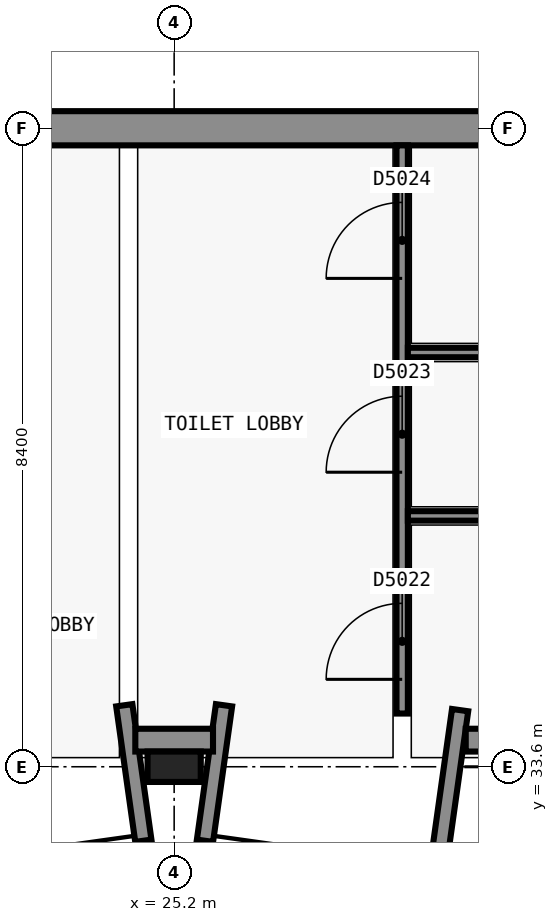
"""IFC4 building model, lengths in metres.
Left out: names, types, materials, properties, quantities, classifications, styles, units other than length and angle.
Written with IfcOpenShell. Run it as: python <this file> out.ifc"""

import sys

from ifc_helpers import new_model, si_unit, direction, frame, frame_2d, origin, origin_2d, place, context, subcontext, project, spatial, rectangle, extrude, element, fill, save


model = new_model("IFC4")
c1 = context("Model", 3, precision=1e-05, world=origin(), true_north=direction((0.0, 1.0)))
c2 = subcontext(c1, "Body", "Model", "MODEL_VIEW")
j1 = project(units=[si_unit("LENGTHUNIT", "METRE"), si_unit("PLANEANGLEUNIT", "RADIAN")], contexts=[c1])
p1 = place(None, origin())
s1 = spatial("IfcSite", under=j1, at=p1, CompositionType="ELEMENT")
p2 = place(p1, origin())
s2 = spatial("IfcBuilding", under=s1, at=p2, CompositionType="ELEMENT")
p3 = place(p2, frame((0.0, 0.0, 24.6)))
s3 = spatial("IfcBuildingStorey", under=s2, at=p3, CompositionType="ELEMENT", Elevation=24.6)
p4 = place(p3, frame((33.6, 42.0, 0.0), z_axis=(0.0, 0.0, 1.0), x_axis=(-1.0, 0.0, 0.0)))
e1 = element("IfcWall", 1, at=p4, inside=s3, PredefinedType="SHEAR", context=c2, shape_type="SweptSolid", body=[
    extrude(rectangle(XDim=16.575, YDim=0.45, at=frame_2d((8.288, 0.0))), origin(), (0.0, 0.0, 1.0), 4.5),
])
p5 = place(p3, frame((25.2, 33.6, 0.0), z_axis=(0.0, 0.0, 1.0), x_axis=(1.0, 0.0, 0.0)))
e2 = element("IfcColumn", 2, at=p5, inside=s3, PredefinedType="COLUMN", context=c2, shape_type="SweptSolid", body=[
    extrude(rectangle(XDim=0.7, YDim=0.4, at=origin_2d()), origin(), (0.0, 0.0, 1.0), 4.5),
])
for number, where, z_axis, x_axis in (
    (3, (24.544, 34.409, 0.0), (0.0, 0.0, 1.0), (0.139, -0.99, 0.0)),
    (4, (25.856, 34.409, 0.0), (0.0, 0.0, 1.0), (-0.139, -0.99, 0.0)),
):
    element("IfcWall", number, at=place(p3, frame(where, z_axis=z_axis, x_axis=x_axis)), inside=s3, PredefinedType="SOLIDWALL", context=c2, shape_type="SweptSolid", body=[
        extrude(rectangle(XDim=1.8, YDim=0.215, at=frame_2d((0.9, 0.0))), origin(), (0.0, 0.0, 1.0), 4.2),
    ])
p6 = place(p3, frame((28.962, 34.345, 0.0), z_axis=(0.0, 0.0, 1.0), x_axis=(-0.139230687381, -0.99025997379, 0.0)))
e5 = element("IfcWall", 5, at=p6, inside=s3, PredefinedType="SOLIDWALL", context=c2, shape_type="SweptSolid", body=[
    extrude(rectangle(XDim=2.169, YDim=0.215, at=frame_2d((1.084, 0.0))), origin(), (0.0, 0.0, 1.0), 4.2),
])
p7 = place(p3, frame((25.711, 33.95, 0.0), z_axis=(0.0, 0.0, 1.0), x_axis=(-1.0, 0.0, 0.0)))
e6 = element("IfcWall", 6, at=p7, inside=s3, PredefinedType="SOLIDWALL", context=c2, shape_type="SweptSolid", body=[
    extrude(rectangle(XDim=1.022, YDim=0.3, at=frame_2d((0.511, 0.0))), origin(), (0.0, 0.0, 1.0), 3.962),
])
p8 = place(p3, frame((29.764, 33.95, 0.0), z_axis=(0.0, 0.0, 1.0), x_axis=(-1.0, 0.0, 0.0)))
e7 = element("IfcWall", 7, at=p8, inside=s3, PredefinedType="SOLIDWALL", context=c2, shape_type="SweptSolid", body=[
    extrude(rectangle(XDim=0.728, YDim=0.3, at=frame_2d((0.364, 0.0))), origin(), (0.0, 0.0, 1.0), 3.962),
])
p9 = place(p3, frame((28.2, 34.3, 0.0), z_axis=(0.0, 0.0, 1.0), x_axis=(0.0, 1.0, 0.0)))
e8 = element("IfcWall", 8, at=p9, inside=s3, PredefinedType="PARTITIONING", context=c2, shape_type="SweptSolid", body=[
    extrude(rectangle(XDim=7.475, YDim=0.15, at=frame_2d((3.737, 0.0))), origin(), (0.0, 0.0, 1.0), 4.1),
])
p10 = place(p9, frame((0.45, 0.0, 0.0)))
e9 = element("IfcOpeningElement", 9, at=p10, cuts=e8, PredefinedType="OPENING", context=c2, shape_type="SweptSolid", body=[
    extrude(rectangle(XDim=1.0, YDim=2.1, at=frame_2d((0.5, 1.05))), frame((0.0, 0.085, 0.0), z_axis=(0.0, -1.0, 0.0), x_axis=(1.0, 0.0, 0.0)), (0.0, 0.0, 1.0), 0.17),
])
p11 = place(p9, frame((3.175, 0.0, 0.0)))
e10 = element("IfcOpeningElement", 10, at=p11, cuts=e8, PredefinedType="OPENING", context=c2, shape_type="SweptSolid", body=[
    extrude(rectangle(XDim=1.0, YDim=2.1, at=frame_2d((0.5, 1.05))), frame((0.0, 0.085, 0.0), z_axis=(0.0, -1.0, 0.0), x_axis=(1.0, 0.0, 0.0)), (0.0, 0.0, 1.0), 0.17),
])
p12 = place(p9, frame((5.725, 0.0, 0.0)))
e11 = element("IfcOpeningElement", 11, at=p12, cuts=e8, PredefinedType="OPENING", context=c2, shape_type="SweptSolid", body=[
    extrude(rectangle(XDim=1.0, YDim=2.1, at=frame_2d((0.5, 1.05))), frame((0.0, 0.085, 0.0), z_axis=(0.0, -1.0, 0.0), x_axis=(1.0, 0.0, 0.0)), (0.0, 0.0, 1.0), 0.17),
])
for number, where, z_axis, x_axis in (
    (12, (28.275, 36.9, 0.0), (0.0, 0.0, 1.0), (1.0, 0.0, 0.0)),
    (13, (28.275, 39.05, 0.0), (0.0, 0.0, 1.0), (1.0, 0.0, 0.0)),
):
    element("IfcWall", number, at=place(p3, frame(where, z_axis=z_axis, x_axis=x_axis)), inside=s3, PredefinedType="PARTITIONING", context=c2, shape_type="SweptSolid", body=[
        extrude(rectangle(XDim=5.388, YDim=0.125, at=frame_2d((2.694, 0.0))), origin(), (0.0, 0.0, 1.0), 3.4),
    ])
p13 = place(p10, origin())
e14 = element("IfcDoor", 14, at=p13, inside=s3, OperationType="SINGLE_SWING_RIGHT", PredefinedType="DOOR", context=c2, shape_type="SweptSolid", body=[
    extrude(rectangle(XDim=1.0, YDim=2.1, at=frame_2d((0.5, 1.05))), frame((0.0, 0.025, 0.0), z_axis=(0.0, -1.0, 0.0), x_axis=(1.0, 0.0, 0.0)), (0.0, 0.0, 1.0), 0.05),
])
fill(e9, e14)
p14 = place(p11, origin())
e15 = element("IfcDoor", 15, at=p14, inside=s3, OperationType="SINGLE_SWING_LEFT", PredefinedType="DOOR", context=c2, shape_type="SweptSolid", body=[
    extrude(rectangle(XDim=1.0, YDim=2.1, at=frame_2d((0.5, 1.05))), frame((0.0, 0.025, 0.0), z_axis=(0.0, -1.0, 0.0), x_axis=(1.0, 0.0, 0.0)), (0.0, 0.0, 1.0), 0.05),
])
fill(e10, e15)
p15 = place(p12, origin())
e16 = element("IfcDoor", 16, at=p15, inside=s3, OperationType="SINGLE_SWING_RIGHT", PredefinedType="DOOR", context=c2, shape_type="SweptSolid", body=[
    extrude(rectangle(XDim=1.0, YDim=2.1, at=frame_2d((0.5, 1.05))), frame((0.0, 0.025, 0.0), z_axis=(0.0, -1.0, 0.0), x_axis=(1.0, 0.0, 0.0)), (0.0, 0.0, 1.0), 0.05),
])
fill(e11, e16)
save(model, sys.argv[1])
